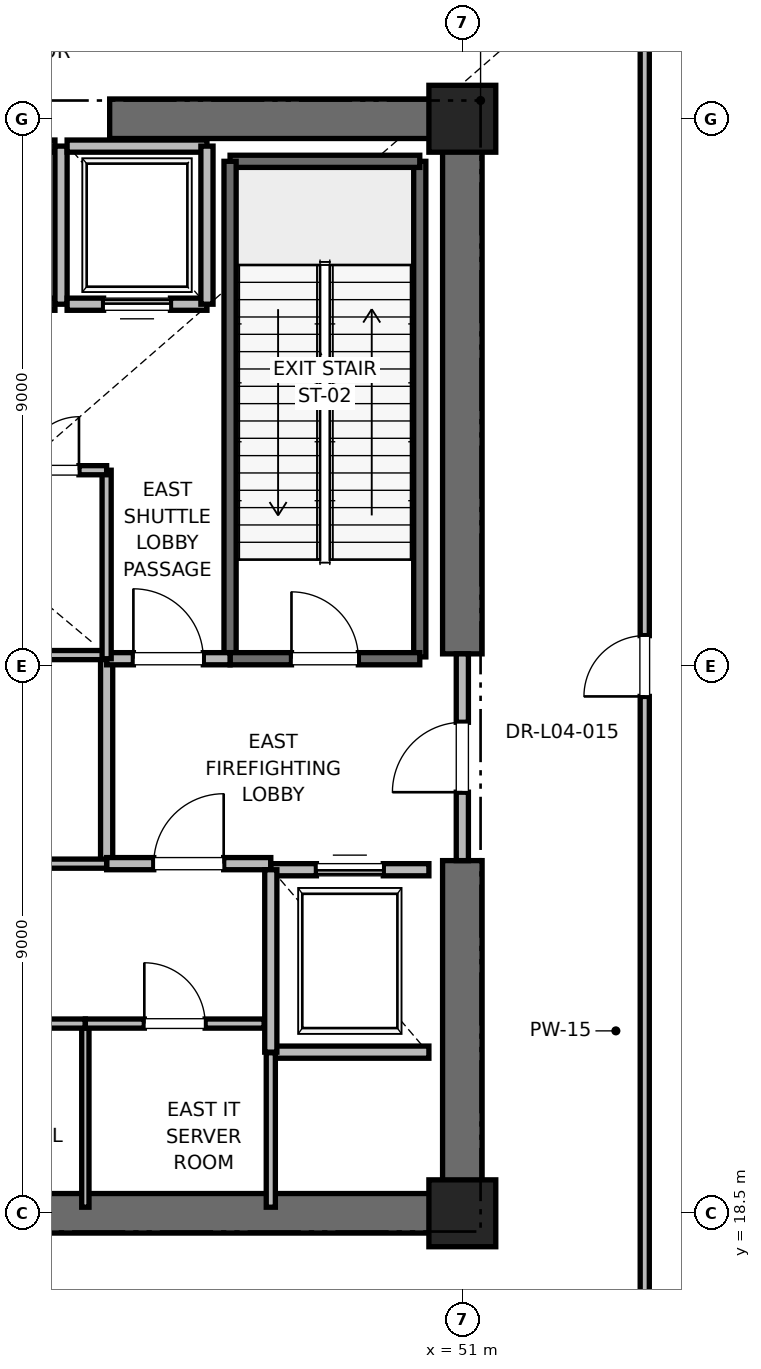
"""IFC4 building model, lengths in metres.
Left out: names, types, materials, properties, quantities, classifications, styles, units other than length and angle.
Written with IfcOpenShell. Run it as: python <this file> out.ifc"""

import sys

from ifc_helpers import new_model, si_unit, direction, frame, frame_2d, origin, origin_2d, place, context, subcontext, project, spatial, rectangle, extrude, element, fill, save


model = new_model("IFC4")
c1 = context("Model", 3, precision=1e-05, world=origin(), true_north=direction((0.0, 1.0)))
c2 = subcontext(c1, "Body", "Model", "MODEL_VIEW")
j1 = project(units=[si_unit("LENGTHUNIT", "METRE"), si_unit("PLANEANGLEUNIT", "RADIAN")], contexts=[c1])
p1 = place(None, origin())
s1 = spatial("IfcSite", under=j1, at=p1, CompositionType="ELEMENT")
p2 = place(p1, origin())
s2 = spatial("IfcBuilding", under=s1, at=p2, CompositionType="ELEMENT")
p3 = place(p2, frame((0.0, 0.0, 21.6)))
s3 = spatial("IfcBuildingStorey", under=s2, at=p3, CompositionType="ELEMENT", Elevation=21.6)
for number, where, z_axis, x_axis in (
    (1, (51.0, 18.5, 0.0), (0.0, 0.0, 1.0), (1.0, 0.0, 0.0)),
    (2, (51.0, 36.5, 0.0), (0.0, 0.0, 1.0), (1.0, 0.0, 0.0)),
):
    element("IfcColumn", number, at=place(p3, frame(where, z_axis=z_axis, x_axis=x_axis)), inside=s3, PredefinedType="PILASTER", context=c2, shape_type="SweptSolid", body=[
        extrude(rectangle(XDim=1.1, YDim=1.1, at=origin_2d()), origin(), (0.0, 0.0, 1.0), 6.0),
    ])
p4 = place(p3, frame((41.8, 18.5, 0.0), z_axis=(0.0, 0.0, 1.0), x_axis=(1.0, 0.0, 0.0)))
e3 = element("IfcWall", 3, at=p4, inside=s3, PredefinedType="SHEAR", context=c2, shape_type="SweptSolid", body=[
    extrude(rectangle(XDim=9.2, YDim=0.65, at=frame_2d((4.6, 0.0))), origin(), (0.0, 0.0, 1.0), 5.76),
])
for number, where, z_axis, x_axis in (
    (4, (45.2, 36.5, 0.0), (0.0, 0.0, 1.0), (1.0, 0.0, 0.0)),
    (5, (51.0, 18.5, 0.0), (0.0, 0.0, 1.0), (0.0, 1.0, 0.0)),
):
    element("IfcWall", number, at=place(p3, frame(where, z_axis=z_axis, x_axis=x_axis)), inside=s3, PredefinedType="SHEAR", context=c2, shape_type="SweptSolid", body=[
        extrude(rectangle(XDim=5.8, YDim=0.65, at=frame_2d((2.9, 0.0))), origin(), (0.0, 0.0, 1.0), 5.76),
    ])
p5 = place(p3, frame((51.0, 27.7, 0.0), z_axis=(0.0, 0.0, 1.0), x_axis=(0.0, 1.0, 0.0)))
e6 = element("IfcWall", 6, at=p5, inside=s3, PredefinedType="SHEAR", context=c2, shape_type="SweptSolid", body=[
    extrude(rectangle(XDim=8.8, YDim=0.65, at=frame_2d((4.4, 0.0))), origin(), (0.0, 0.0, 1.0), 5.76),
])
p6 = place(p3, frame((50.3, 27.65, 0.0), z_axis=(0.0, 0.0, 1.0), x_axis=(0.0, 1.0, 0.0)))
e7 = element("IfcWall", 7, at=p6, inside=s3, PredefinedType="SOLIDWALL", context=c2, shape_type="SweptSolid", body=[
    extrude(rectangle(XDim=8.15, YDim=0.2, at=frame_2d((4.075, 0.0))), origin(), (0.0, 0.0, 1.0), 5.76),
])
p7 = place(p3, frame((47.18, 35.8, 0.0), z_axis=(0.0, 0.0, 1.0), x_axis=(1.0, 0.0, 0.0)))
e8 = element("IfcWall", 8, at=p7, inside=s3, PredefinedType="SOLIDWALL", context=c2, shape_type="SweptSolid", body=[
    extrude(rectangle(XDim=3.12, YDim=0.2, at=frame_2d((1.56, 0.0))), origin(), (0.0, 0.0, 1.0), 5.76),
])
p8 = place(p3, frame((47.18, 27.62, 0.0), z_axis=(0.0, 0.0, 1.0), x_axis=(0.0, 1.0, 0.0)))
e9 = element("IfcWall", 9, at=p8, inside=s3, PredefinedType="SOLIDWALL", context=c2, shape_type="SweptSolid", body=[
    extrude(rectangle(XDim=8.18, YDim=0.2, at=frame_2d((4.09, 0.0))), origin(), (0.0, 0.0, 1.0), 5.76),
])
p9 = place(p3, frame((47.18, 27.62, 0.0), z_axis=(0.0, 0.0, 1.0), x_axis=(1.0, 0.0, 0.0)))
e10 = element("IfcWall", 10, at=p9, inside=s3, PredefinedType="SOLIDWALL", context=c2, shape_type="SweptSolid", body=[
    extrude(rectangle(XDim=3.12, YDim=0.2, at=frame_2d((1.56, 0.0))), origin(), (0.0, 0.0, 1.0), 5.76),
])
p10 = place(p9, frame((1.01, 0.0, 0.0)))
e11 = element("IfcOpeningElement", 11, at=p10, cuts=e10, PredefinedType="OPENING", context=c2, shape_type="SweptSolid", body=[
    extrude(rectangle(XDim=1.1, YDim=2.15, at=frame_2d((0.55, 1.075))), frame((0.0, 0.1, 0.0), z_axis=(0.0, -1.0, 0.0), x_axis=(1.0, 0.0, 0.0)), (0.0, 0.0, 1.0), 0.2),
])
p11 = place(p3, frame((45.15, 24.25, 0.0), z_axis=(0.0, 0.0, 1.0), x_axis=(0.0, 1.0, 0.0)))
e12 = element("IfcWall", 12, at=p11, inside=s3, PredefinedType="PARTITIONING", context=c2, shape_type="SweptSolid", body=[
    extrude(rectangle(XDim=3.37, YDim=0.2, at=frame_2d((1.685, 0.0))), origin(), (0.0, 0.0, 1.0), 5.76),
])
p12 = place(p3, frame((45.15, 24.25, 0.0), z_axis=(0.0, 0.0, 1.0), x_axis=(1.0, 0.0, 0.0)))
e13 = element("IfcWall", 13, at=p12, inside=s3, PredefinedType="PARTITIONING", context=c2, shape_type="SweptSolid", body=[
    extrude(rectangle(XDim=2.7, YDim=0.2, at=frame_2d((1.35, 0.0))), origin(), (0.0, 0.0, 1.0), 5.76),
])
p13 = place(p12, frame((0.775, 0.0, 0.0)))
e14 = element("IfcOpeningElement", 14, at=p13, cuts=e13, PredefinedType="OPENING", context=c2, shape_type="SweptSolid", body=[
    extrude(rectangle(XDim=1.15, YDim=2.2, at=frame_2d((0.575, 1.1))), frame((0.0, 0.1, 0.0), z_axis=(0.0, -1.0, 0.0), x_axis=(1.0, 0.0, 0.0)), (0.0, 0.0, 1.0), 0.2),
])
p14 = place(p3, frame((45.15, 27.62, 0.0), z_axis=(0.0, 0.0, 1.0), x_axis=(1.0, 0.0, 0.0)))
e15 = element("IfcWall", 15, at=p14, inside=s3, PredefinedType="PARTITIONING", context=c2, shape_type="SweptSolid", body=[
    extrude(rectangle(XDim=2.03, YDim=0.2, at=frame_2d((1.015, 0.0))), origin(), (0.0, 0.0, 1.0), 5.76),
])
p15 = place(p14, frame((0.44, 0.0, 0.0)))
e16 = element("IfcOpeningElement", 16, at=p15, cuts=e15, PredefinedType="OPENING", context=c2, shape_type="SweptSolid", body=[
    extrude(rectangle(XDim=1.15, YDim=2.2, at=frame_2d((0.575, 1.1))), frame((0.0, 0.1, 0.0), z_axis=(0.0, -1.0, 0.0), x_axis=(1.0, 0.0, 0.0)), (0.0, 0.0, 1.0), 0.2),
])
p16 = place(p3, frame((51.0, 24.3, 0.0), z_axis=(0.0, 0.0, 1.0), x_axis=(0.0, 1.0, 0.0)))
e17 = element("IfcWall", 17, at=p16, inside=s3, PredefinedType="PARTITIONING", context=c2, shape_type="SweptSolid", body=[
    extrude(rectangle(XDim=3.4, YDim=0.2, at=frame_2d((1.7, 0.0))), origin(), (0.0, 0.0, 1.0), 4.54),
])
p17 = place(p16, frame((1.125, 0.0, 0.0)))
e18 = element("IfcOpeningElement", 18, at=p17, cuts=e17, PredefinedType="OPENING", context=c2, shape_type="SweptSolid", body=[
    extrude(rectangle(XDim=1.15, YDim=2.2, at=frame_2d((0.575, 1.1))), frame((0.0, 0.1, 0.0), z_axis=(0.0, -1.0, 0.0), x_axis=(1.0, 0.0, 0.0)), (0.0, 0.0, 1.0), 0.2),
])
p18 = place(p3, frame((47.85, 21.15, 0.0), z_axis=(0.0, 0.0, 1.0), x_axis=(1.0, 0.0, 0.0)))
e19 = element("IfcWall", 19, at=p18, inside=s3, PredefinedType="SOLIDWALL", context=c2, shape_type="SweptSolid", body=[
    extrude(rectangle(XDim=2.6, YDim=0.2, at=frame_2d((1.3, 0.0))), origin(), (0.0, 0.0, 1.0), 5.76),
])
p19 = place(p3, frame((50.45, 24.15, 0.0), z_axis=(0.0, 0.0, 1.0), x_axis=(-1.0, 0.0, 0.0)))
e20 = element("IfcWall", 20, at=p19, inside=s3, PredefinedType="SOLIDWALL", context=c2, shape_type="SweptSolid", body=[
    extrude(rectangle(XDim=2.6, YDim=0.2, at=frame_2d((1.3, 0.0))), origin(), (0.0, 0.0, 1.0), 4.54),
])
p20 = place(p19, frame((0.75, 0.0, 0.0)))
e21 = element("IfcOpeningElement", 21, at=p20, cuts=e20, PredefinedType="OPENING", context=c2, shape_type="SweptSolid", body=[
    extrude(rectangle(XDim=1.1, YDim=2.2, at=frame_2d((0.55, 1.1))), frame((0.0, 0.1, 0.0), z_axis=(0.0, -1.0, 0.0), x_axis=(1.0, 0.0, 0.0)), (0.0, 0.0, 1.0), 0.2),
])
p21 = place(p3, frame((47.85, 24.15, 0.0), z_axis=(0.0, 0.0, 1.0), x_axis=(0.0, -1.0, 0.0)))
e22 = element("IfcWall", 22, at=p21, inside=s3, PredefinedType="SOLIDWALL", context=c2, shape_type="SweptSolid", body=[
    extrude(rectangle(XDim=3.0, YDim=0.2, at=frame_2d((1.5, 0.0))), origin(), (0.0, 0.0, 1.0), 5.76),
])
p22 = place(p3, frame((42.0, 33.45, 0.0), z_axis=(0.0, 0.0, 1.0), x_axis=(1.0, 0.0, 0.0)))
e23 = element("IfcWall", 23, at=p22, inside=s3, PredefinedType="SOLIDWALL", context=c2, shape_type="SweptSolid", body=[
    extrude(rectangle(XDim=2.3, YDim=0.2, at=frame_2d((1.15, 0.0))), origin(), (0.0, 0.0, 1.0), 5.76),
])
p23 = place(p22, frame((0.6, 0.0, 0.0)))
e24 = element("IfcOpeningElement", 24, at=p23, cuts=e23, PredefinedType="OPENING", context=c2, shape_type="SweptSolid", body=[
    extrude(rectangle(XDim=1.1, YDim=2.2, at=frame_2d((0.55, 1.1))), frame((0.0, 0.1, 0.0), z_axis=(0.0, -1.0, 0.0), x_axis=(1.0, 0.0, 0.0)), (0.0, 0.0, 1.0), 0.2),
])
p24 = place(p3, frame((44.3, 36.05, 0.0), z_axis=(0.0, 0.0, 1.0), x_axis=(-1.0, 0.0, 0.0)))
e25 = element("IfcWall", 25, at=p24, inside=s3, PredefinedType="SOLIDWALL", context=c2, shape_type="SweptSolid", body=[
    extrude(rectangle(XDim=2.3, YDim=0.2, at=frame_2d((1.15, 0.0))), origin(), (0.0, 0.0, 1.0), 4.54),
])
p25 = place(p3, frame((44.4, 33.45, 0.0), z_axis=(0.0, 0.0, 1.0), x_axis=(0.0, 1.0, 0.0)))
e26 = element("IfcWall", 26, at=p25, inside=s3, PredefinedType="SOLIDWALL", context=c2, shape_type="SweptSolid", body=[
    extrude(rectangle(XDim=2.6, YDim=0.2, at=frame_2d((1.3, 0.0))), origin(), (0.0, 0.0, 1.0), 4.54),
])
p26 = place(p3, frame((44.5, 33.45, 0.0), z_axis=(0.0, 0.0, 1.0), x_axis=(1.0, 0.0, 0.0)))
e27 = element("IfcWall", 27, at=p26, inside=s3, PredefinedType="SOLIDWALL", context=c2, shape_type="SweptSolid", body=[
    extrude(rectangle(XDim=2.3, YDim=0.2, at=frame_2d((1.15, 0.0))), origin(), (0.0, 0.0, 1.0), 5.76),
])
p27 = place(p26, frame((0.6, 0.0, 0.0)))
e28 = element("IfcOpeningElement", 28, at=p27, cuts=e27, PredefinedType="OPENING", context=c2, shape_type="SweptSolid", body=[
    extrude(rectangle(XDim=1.1, YDim=2.2, at=frame_2d((0.55, 1.1))), frame((0.0, 0.1, 0.0), z_axis=(0.0, -1.0, 0.0), x_axis=(1.0, 0.0, 0.0)), (0.0, 0.0, 1.0), 0.2),
])
p28 = place(p3, frame((46.8, 36.05, 0.0), z_axis=(0.0, 0.0, 1.0), x_axis=(-1.0, 0.0, 0.0)))
e29 = element("IfcWall", 29, at=p28, inside=s3, PredefinedType="SOLIDWALL", context=c2, shape_type="SweptSolid", body=[
    extrude(rectangle(XDim=2.3, YDim=0.2, at=frame_2d((1.15, 0.0))), origin(), (0.0, 0.0, 1.0), 4.54),
])
p29 = place(p3, frame((46.8, 33.45, 0.0), z_axis=(0.0, 0.0, 1.0), x_axis=(0.0, 1.0, 0.0)))
e30 = element("IfcWall", 30, at=p29, inside=s3, PredefinedType="SOLIDWALL", context=c2, shape_type="SweptSolid", body=[
    extrude(rectangle(XDim=2.6, YDim=0.2, at=frame_2d((1.3, 0.0))), origin(), (0.0, 0.0, 1.0), 5.76),
])
p30 = place(p3, frame((41.56, 27.68, 0.0), z_axis=(0.0, 0.0, 1.0), x_axis=(1.0, 0.0, 0.0)))
e31 = element("IfcWall", 31, at=p30, inside=s3, PredefinedType="PARTITIONING", context=c2, shape_type="SweptSolid", body=[
    extrude(rectangle(XDim=3.59, YDim=0.15, at=frame_2d((1.795, 0.0))), origin(), (0.0, 0.0, 1.0), 2.85),
])
p31 = place(p3, frame((47.85, 18.6, 0.0), z_axis=(0.0, 0.0, 1.0), x_axis=(0.0, 1.0, 0.0)))
e32 = element("IfcWall", 32, at=p31, inside=s3, PredefinedType="PARTITIONING", context=c2, shape_type="SweptSolid", body=[
    extrude(rectangle(XDim=2.54, YDim=0.15, at=frame_2d((1.27, 0.0))), origin(), (0.0, 0.0, 1.0), 2.85),
])
p32 = place(p3, frame((44.8, 18.6, 0.0), z_axis=(0.0, 0.0, 1.0), x_axis=(0.0, 1.0, 0.0)))
e33 = element("IfcWall", 33, at=p32, inside=s3, PredefinedType="PARTITIONING", context=c2, shape_type="SweptSolid", body=[
    extrude(rectangle(XDim=3.02, YDim=0.12, at=frame_2d((1.51, 0.0))), origin(), (0.0, 0.0, 1.0), 2.85),
])
p33 = place(p3, frame((41.76, 21.62, 0.0), z_axis=(0.0, 0.0, 1.0), x_axis=(1.0, 0.0, 0.0)))
e34 = element("IfcWall", 34, at=p33, inside=s3, PredefinedType="PARTITIONING", context=c2, shape_type="SweptSolid", body=[
    extrude(rectangle(XDim=3.04, YDim=0.15, at=frame_2d((1.52, 0.0))), origin(), (0.0, 0.0, 1.0), 2.85),
])
p34 = place(p33, frame((1.02, 0.0, 0.0)))
e35 = element("IfcOpeningElement", 35, at=p34, cuts=e34, PredefinedType="OPENING", context=c2, shape_type="SweptSolid", body=[
    extrude(rectangle(XDim=1.0, YDim=2.15, at=frame_2d((0.5, 1.075))), frame((0.0, 0.075, 0.0), z_axis=(0.0, -1.0, 0.0), x_axis=(1.0, 0.0, 0.0)), (0.0, 0.0, 1.0), 0.15),
])
p35 = place(p3, frame((44.8, 21.62, 0.0), z_axis=(0.0, 0.0, 1.0), x_axis=(1.0, 0.0, 0.0)))
e36 = element("IfcWall", 36, at=p35, inside=s3, PredefinedType="PARTITIONING", context=c2, shape_type="SweptSolid", body=[
    extrude(rectangle(XDim=2.94, YDim=0.15, at=frame_2d((1.47, 0.0))), origin(), (0.0, 0.0, 1.0), 2.85),
])
p36 = place(p35, frame((0.97, 0.0, 0.0)))
e37 = element("IfcOpeningElement", 37, at=p36, cuts=e36, PredefinedType="OPENING", context=c2, shape_type="SweptSolid", body=[
    extrude(rectangle(XDim=1.0, YDim=2.15, at=frame_2d((0.5, 1.075))), frame((0.0, 0.075, 0.0), z_axis=(0.0, -1.0, 0.0), x_axis=(1.0, 0.0, 0.0)), (0.0, 0.0, 1.0), 0.15),
])
p37 = place(p3, frame((41.76, 24.25, 0.0), z_axis=(0.0, 0.0, 1.0), x_axis=(1.0, 0.0, 0.0)))
e38 = element("IfcWall", 38, at=p37, inside=s3, PredefinedType="PARTITIONING", context=c2, shape_type="SweptSolid", body=[
    extrude(rectangle(XDim=3.39, YDim=0.15, at=frame_2d((1.695, 0.0))), origin(), (0.0, 0.0, 1.0), 2.85),
])
p38 = place(p37, frame((1.255, 0.0, 0.0)))
e39 = element("IfcOpeningElement", 39, at=p38, cuts=e38, PredefinedType="OPENING", context=c2, shape_type="SweptSolid", body=[
    extrude(rectangle(XDim=0.88, YDim=2.1, at=frame_2d((0.44, 1.05))), frame((0.0, 0.075, 0.0), z_axis=(0.0, -1.0, 0.0), x_axis=(1.0, 0.0, 0.0)), (0.0, 0.0, 1.0), 0.15),
])
p39 = place(p3, frame((45.15, 27.62, 0.0), z_axis=(0.0, 0.0, 1.0), x_axis=(0.0, 1.0, 0.0)))
e40 = element("IfcWall", 40, at=p39, inside=s3, PredefinedType="PARTITIONING", context=c2, shape_type="SweptSolid", body=[
    extrude(rectangle(XDim=3.1, YDim=0.15, at=frame_2d((1.55, 0.0))), origin(), (0.0, 0.0, 1.0), 2.85),
])
p40 = place(p3, frame((43.36, 30.72, 0.0), z_axis=(0.0, 0.0, 1.0), x_axis=(1.0, 0.0, 0.0)))
e41 = element("IfcWall", 41, at=p40, inside=s3, PredefinedType="PARTITIONING", context=c2, shape_type="SweptSolid", body=[
    extrude(rectangle(XDim=1.79, YDim=0.15, at=frame_2d((0.895, 0.0))), origin(), (0.0, 0.0, 1.0), 2.85),
])
p41 = place(p40, frame((0.455, 0.0, 0.0)))
e42 = element("IfcOpeningElement", 42, at=p41, cuts=e41, PredefinedType="OPENING", context=c2, shape_type="SweptSolid", body=[
    extrude(rectangle(XDim=0.88, YDim=2.1, at=frame_2d((0.44, 1.05))), frame((0.0, 0.075, 0.0), z_axis=(0.0, -1.0, 0.0), x_axis=(1.0, 0.0, 0.0)), (0.0, 0.0, 1.0), 0.15),
])
p42 = place(p3, frame((54.0, 16.0, 0.0), z_axis=(0.0, 0.0, 1.0), x_axis=(0.0, 1.0, 0.0)))
e43 = element("IfcWall", 43, at=p42, inside=s3, PredefinedType="PARTITIONING", context=c2, shape_type="SweptSolid", body=[
    extrude(rectangle(XDim=23.0, YDim=0.15, at=frame_2d((11.5, 0.0))), origin(), (0.0, 0.0, 1.0), 2.85),
])
p43 = place(p42, frame((11.0, 0.0, 0.0)))
e44 = element("IfcOpeningElement", 44, at=p43, cuts=e43, PredefinedType="OPENING", context=c2, shape_type="SweptSolid", body=[
    extrude(rectangle(XDim=1.0, YDim=2.15, at=frame_2d((0.5, 1.075))), frame((0.0, 0.075, 0.0), z_axis=(0.0, -1.0, 0.0), x_axis=(1.0, 0.0, 0.0)), (0.0, 0.0, 1.0), 0.15),
])
p44 = place(p10, origin())
e45 = element("IfcDoor", 45, at=p44, inside=s3, OperationType="SINGLE_SWING_LEFT", PredefinedType="DOOR", context=c2, shape_type="SweptSolid", body=[
    extrude(rectangle(XDim=1.1, YDim=2.15, at=frame_2d((0.55, 1.075))), frame((0.0, 0.025, 0.0), z_axis=(0.0, -1.0, 0.0), x_axis=(1.0, 0.0, 0.0)), (0.0, 0.0, 1.0), 0.05),
])
fill(e11, e45)
p45 = place(p13, origin())
e46 = element("IfcDoor", 46, at=p45, inside=s3, OperationType="SINGLE_SWING_RIGHT", PredefinedType="DOOR", context=c2, shape_type="SweptSolid", body=[
    extrude(rectangle(XDim=1.15, YDim=2.2, at=frame_2d((0.575, 1.1))), frame((0.0, 0.025, 0.0), z_axis=(0.0, -1.0, 0.0), x_axis=(1.0, 0.0, 0.0)), (0.0, 0.0, 1.0), 0.05),
])
fill(e14, e46)
p46 = place(p15, origin())
e47 = element("IfcDoor", 47, at=p46, inside=s3, OperationType="SINGLE_SWING_LEFT", PredefinedType="DOOR", context=c2, shape_type="SweptSolid", body=[
    extrude(rectangle(XDim=1.15, YDim=2.2, at=frame_2d((0.575, 1.1))), frame((0.0, 0.025, 0.0), z_axis=(0.0, -1.0, 0.0), x_axis=(1.0, 0.0, 0.0)), (0.0, 0.0, 1.0), 0.05),
])
fill(e16, e47)
p47 = place(p17, origin())
e48 = element("IfcDoor", 48, at=p47, inside=s3, OperationType="SINGLE_SWING_LEFT", PredefinedType="DOOR", context=c2, shape_type="SweptSolid", body=[
    extrude(rectangle(XDim=1.15, YDim=2.2, at=frame_2d((0.575, 1.1))), frame((0.0, 0.025, 0.0), z_axis=(0.0, -1.0, 0.0), x_axis=(1.0, 0.0, 0.0)), (0.0, 0.0, 1.0), 0.05),
])
fill(e18, e48)
p48 = place(p20, origin())
e49 = element("IfcDoor", 49, at=p48, inside=s3, OperationType="SLIDING_TO_RIGHT", PredefinedType="DOOR", context=c2, shape_type="SweptSolid", body=[
    extrude(rectangle(XDim=1.1, YDim=2.2, at=frame_2d((0.55, 1.1))), frame((0.0, 0.025, 0.0), z_axis=(0.0, -1.0, 0.0), x_axis=(1.0, 0.0, 0.0)), (0.0, 0.0, 1.0), 0.05),
])
fill(e21, e49)
p49 = place(p27, origin())
e50 = element("IfcDoor", 50, at=p49, inside=s3, OperationType="SLIDING_TO_RIGHT", PredefinedType="DOOR", context=c2, shape_type="SweptSolid", body=[
    extrude(rectangle(XDim=1.1, YDim=2.2, at=frame_2d((0.55, 1.1))), frame((0.0, 0.025, 0.0), z_axis=(0.0, -1.0, 0.0), x_axis=(1.0, 0.0, 0.0)), (0.0, 0.0, 1.0), 0.05),
])
fill(e28, e50)
p50 = place(p36, origin())
e51 = element("IfcDoor", 51, at=p50, inside=s3, OperationType="SINGLE_SWING_LEFT", PredefinedType="DOOR", context=c2, shape_type="SweptSolid", body=[
    extrude(rectangle(XDim=1.0, YDim=2.15, at=frame_2d((0.5, 1.075))), frame((0.0, 0.025, 0.0), z_axis=(0.0, -1.0, 0.0), x_axis=(1.0, 0.0, 0.0)), (0.0, 0.0, 1.0), 0.05),
])
fill(e37, e51)
p51 = place(p41, origin())
e52 = element("IfcDoor", 52, at=p51, inside=s3, OperationType="SINGLE_SWING_RIGHT", PredefinedType="DOOR", context=c2, shape_type="SweptSolid", body=[
    extrude(rectangle(XDim=0.88, YDim=2.1, at=frame_2d((0.44, 1.05))), frame((0.0, 0.025, 0.0), z_axis=(0.0, -1.0, 0.0), x_axis=(1.0, 0.0, 0.0)), (0.0, 0.0, 1.0), 0.05),
])
fill(e42, e52)
p52 = place(p43, origin())
e53 = element("IfcDoor", 53, at=p52, inside=s3, OperationType="SINGLE_SWING_LEFT", PredefinedType="DOOR", context=c2, shape_type="SweptSolid", body=[
    extrude(rectangle(XDim=1.0, YDim=2.15, at=frame_2d((0.5, 1.075))), frame((0.0, 0.025, 0.0), z_axis=(0.0, -1.0, 0.0), x_axis=(1.0, 0.0, 0.0)), (0.0, 0.0, 1.0), 0.05),
])
fill(e44, e53)
save(model, sys.argv[1])
